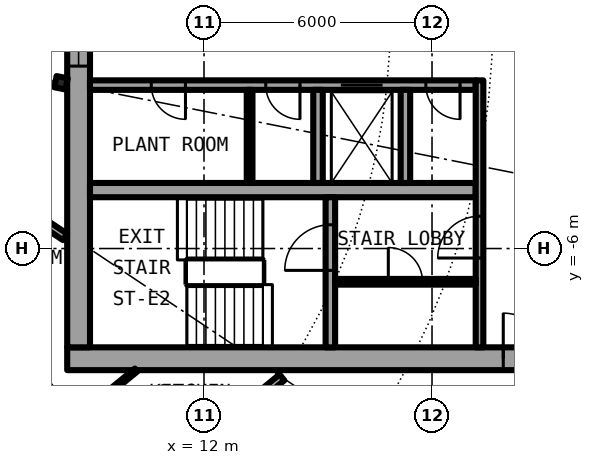
"""IFC4 building model, lengths in metres.
Left out: names, types, materials, properties, quantities, classifications, styles, units other than length and angle.
Written with IfcOpenShell. Run it as: python <this file> out.ifc"""

import sys

from ifc_helpers import new_model, si_unit, direction, frame, frame_2d, origin, origin_2d, place, context, subcontext, project, spatial, rectangle, i_section, extrude, element, fill, save


model = new_model("IFC4")
c1 = context("Model", 3, precision=1e-05, world=origin(), true_north=direction((0.0, 1.0)))
c2 = subcontext(c1, "Body", "Model", "MODEL_VIEW")
j1 = project(units=[si_unit("LENGTHUNIT", "METRE"), si_unit("PLANEANGLEUNIT", "RADIAN")], contexts=[c1])
p1 = place(None, origin())
s1 = spatial("IfcSite", under=j1, at=p1, CompositionType="ELEMENT")
p2 = place(p1, origin())
s2 = spatial("IfcBuilding", under=s1, at=p2, CompositionType="ELEMENT")
p3 = place(p2, frame((0.0, 0.0, 129.95)))
s3 = spatial("IfcBuildingStorey", under=s2, at=p3, CompositionType="ELEMENT", Elevation=129.95)
p4 = place(p3, frame((8.239, -1.639, 0.0), z_axis=(0.0, 0.0, 1.0), x_axis=(0.980785280403, -0.195090322016, 0.0)))
e1 = element("IfcColumn", 1, at=p4, inside=s3, PredefinedType="COLUMN", context=c2, shape_type="SweptSolid", body=[
    extrude(i_section(OverallWidth=0.3, OverallDepth=0.3, WebThickness=0.011, FlangeThickness=0.019, FilletRadius=0.027, at=origin_2d()), origin(), (0.0, 0.0, 1.0), 3.05),
])
p5 = place(p3, frame((8.4, -8.9, 0.0), z_axis=(0.0, 0.0, 1.0), x_axis=(1.0, 0.0, 0.0)))
e2 = element("IfcWall", 2, at=p5, inside=s3, PredefinedType="SHEAR", context=c2, shape_type="SweptSolid", body=[
    extrude(rectangle(XDim=13.8, YDim=0.6, at=frame_2d((6.9, 0.0))), origin(), (0.0, 0.0, 1.0), 3.05),
])
p6 = place(p5, frame((11.475, 0.0, 0.0)))
e3 = element("IfcOpeningElement", 3, at=p6, cuts=e2, PredefinedType="OPENING", context=c2, shape_type="SweptSolid", body=[
    extrude(rectangle(XDim=1.2, YDim=2.3, at=frame_2d((0.6, 1.15))), frame((0.0, 0.31, 0.0), z_axis=(0.0, -1.0, 0.0), x_axis=(1.0, 0.0, 0.0)), (0.0, 0.0, 1.0), 0.62),
])
p7 = place(p3, frame((8.7, -8.6, 0.0), z_axis=(0.0, 0.0, 1.0), x_axis=(0.0, 1.0, 0.0)))
e4 = element("IfcWall", 4, at=p7, inside=s3, PredefinedType="SHEAR", context=c2, shape_type="SweptSolid", body=[
    extrude(rectangle(XDim=17.2, YDim=0.6, at=frame_2d((8.6, 0.0))), origin(), (0.0, 0.0, 1.0), 3.05),
])
p8 = place(p7, frame((7.4, 0.0, 0.1)))
e5 = element("IfcOpeningElement", 5, at=p8, cuts=e4, PredefinedType="OPENING", context=c2, shape_type="SweptSolid", body=[
    extrude(rectangle(XDim=2.4, YDim=2.2, at=frame_2d((1.2, 1.1))), frame((0.0, 0.31, 0.0), z_axis=(0.0, -1.0, 0.0), x_axis=(1.0, 0.0, 0.0)), (0.0, 0.0, 1.0), 0.62),
])
p9 = place(p3, frame((19.15, -1.7, 0.0), z_axis=(0.0, 0.0, 1.0), x_axis=(-1.0, 0.0, 0.0)))
e6 = element("IfcWall", 6, at=p9, inside=s3, PredefinedType="SHEAR", context=c2, shape_type="SweptSolid", body=[
    extrude(rectangle(XDim=10.15, YDim=0.25, at=frame_2d((5.075, 0.0))), origin(), (0.0, 0.0, 1.0), 3.05),
])
p10 = place(p9, frame((2.45, 0.0, 0.0)))
e7 = element("IfcOpeningElement", 7, at=p10, cuts=e6, PredefinedType="OPENING", context=c2, shape_type="SweptSolid", body=[
    extrude(rectangle(XDim=1.1, YDim=2.3, at=frame_2d((0.55, 1.15))), frame((0.0, 0.135, 0.0), z_axis=(0.0, -1.0, 0.0), x_axis=(1.0, 0.0, 0.0)), (0.0, 0.0, 1.0), 0.27),
])
p11 = place(p9, frame((7.637, 0.0, 0.0)))
e8 = element("IfcOpeningElement", 8, at=p11, cuts=e6, PredefinedType="OPENING", context=c2, shape_type="SweptSolid", body=[
    extrude(rectangle(XDim=0.9, YDim=2.3, at=frame_2d((0.45, 1.15))), frame((0.0, 0.135, 0.0), z_axis=(0.0, -1.0, 0.0), x_axis=(1.0, 0.0, 0.0)), (0.0, 0.0, 1.0), 0.27),
])
p12 = place(p9, frame((4.625, 0.0, 0.0)))
e9 = element("IfcOpeningElement", 9, at=p12, cuts=e6, PredefinedType="OPENING", context=c2, shape_type="SweptSolid", body=[
    extrude(rectangle(XDim=0.9, YDim=2.3, at=frame_2d((0.45, 1.15))), frame((0.0, 0.135, 0.0), z_axis=(0.0, -1.0, 0.0), x_axis=(1.0, 0.0, 0.0)), (0.0, 0.0, 1.0), 0.27),
])
p13 = place(p9, frame((0.413, 0.0, 0.0)))
e10 = element("IfcOpeningElement", 10, at=p13, cuts=e6, PredefinedType="OPENING", context=c2, shape_type="SweptSolid", body=[
    extrude(rectangle(XDim=0.9, YDim=2.3, at=frame_2d((0.45, 1.15))), frame((0.0, 0.135, 0.0), z_axis=(0.0, -1.0, 0.0), x_axis=(1.0, 0.0, 0.0)), (0.0, 0.0, 1.0), 0.27),
])
p14 = place(p3, frame((9.0, -4.462, 0.0), z_axis=(0.0, 0.0, 1.0), x_axis=(1.0, 0.0, 0.0)))
e11 = element("IfcWall", 11, at=p14, inside=s3, PredefinedType="SHEAR", context=c2, shape_type="SweptSolid", body=[
    extrude(rectangle(XDim=10.15, YDim=0.375, at=frame_2d((5.075, 0.0))), origin(), (0.0, 0.0, 1.0), 3.05),
])
p15 = place(p3, frame((15.325, -8.6, 0.0), z_axis=(0.0, 0.0, 1.0), x_axis=(0.0, 1.0, 0.0)))
e12 = element("IfcWall", 12, at=p15, inside=s3, PredefinedType="SHEAR", context=c2, shape_type="SweptSolid", body=[
    extrude(rectangle(XDim=3.95, YDim=0.25, at=frame_2d((1.975, 0.0))), origin(), (0.0, 0.0, 1.0), 3.05),
])
p16 = place(p15, frame((2.025, 0.0, 0.0)))
e13 = element("IfcOpeningElement", 13, at=p16, cuts=e12, PredefinedType="OPENING", context=c2, shape_type="SweptSolid", body=[
    extrude(rectangle(XDim=1.2, YDim=2.3, at=frame_2d((0.6, 1.15))), frame((0.0, 0.135, 0.0), z_axis=(0.0, -1.0, 0.0), x_axis=(1.0, 0.0, 0.0)), (0.0, 0.0, 1.0), 0.27),
])
for number, where, z_axis, x_axis in (
    (14, (15.0, -1.825, 0.0), (0.0, 0.0, 1.0), (0.0, -1.0, 0.0)),
    (15, (17.3, -1.825, 0.0), (0.0, 0.0, 1.0), (0.0, -1.0, 0.0)),
):
    element("IfcWall", number, at=place(p3, frame(where, z_axis=z_axis, x_axis=x_axis)), inside=s3, PredefinedType="SOLIDWALL", context=c2, shape_type="SweptSolid", body=[
        extrude(rectangle(XDim=2.45, YDim=0.25, at=frame_2d((1.225, 0.0))), origin(), (0.0, 0.0, 1.0), 2.7),
    ])
p17 = place(p3, frame((19.25, -8.6, 0.0), z_axis=(0.0, 0.0, 1.0), x_axis=(0.0, 1.0, 0.0)))
e16 = element("IfcWall", 16, at=p17, inside=s3, PredefinedType="SOLIDWALL", context=c2, shape_type="SweptSolid", body=[
    extrude(rectangle(XDim=7.025, YDim=0.2, at=frame_2d((3.513, 0.0))), origin(), (0.0, 0.0, 1.0), 2.7),
])
p18 = place(p17, frame((2.35, 0.0, 0.0)))
e17 = element("IfcOpeningElement", 17, at=p18, cuts=e16, PredefinedType="OPENING", context=c2, shape_type="SweptSolid", body=[
    extrude(rectangle(XDim=1.1, YDim=2.3, at=frame_2d((0.55, 1.15))), frame((0.0, 0.11, 0.0), z_axis=(0.0, -1.0, 0.0), x_axis=(1.0, 0.0, 0.0)), (0.0, 0.0, 1.0), 0.22),
])
p19 = place(p3, frame((13.2, -1.825, 0.0), z_axis=(0.0, 0.0, 1.0), x_axis=(0.0, -1.0, 0.0)))
e18 = element("IfcWall", 18, at=p19, inside=s3, PredefinedType="PARTITIONING", context=c2, shape_type="SweptSolid", body=[
    extrude(rectangle(XDim=2.45, YDim=0.15, at=frame_2d((1.225, 0.0))), origin(), (0.0, 0.0, 1.0), 2.7),
])
p20 = place(p3, frame((15.45, -6.875, 0.0), z_axis=(0.0, 0.0, 1.0), x_axis=(1.0, 0.0, 0.0)))
e19 = element("IfcWall", 19, at=p20, inside=s3, PredefinedType="PARTITIONING", context=c2, shape_type="SweptSolid", body=[
    extrude(rectangle(XDim=3.7, YDim=0.15, at=frame_2d((1.85, 0.0))), origin(), (0.0, 0.0, 1.0), 2.7),
])
p21 = place(p20, frame((1.4, 0.0, 0.0)))
e20 = element("IfcOpeningElement", 20, at=p21, cuts=e19, PredefinedType="OPENING", context=c2, shape_type="SweptSolid", body=[
    extrude(rectangle(XDim=0.9, YDim=2.3, at=frame_2d((0.45, 1.15))), frame((0.0, 0.085, 0.0), z_axis=(0.0, -1.0, 0.0), x_axis=(1.0, 0.0, 0.0)), (0.0, 0.0, 1.0), 0.17),
])
p22 = place(p3, frame((6.467, -15.614, 0.0), z_axis=(0.0, 0.0, 1.0), x_axis=(0.773074935257, 0.634314704605, 0.0)))
e21 = element("IfcWall", 21, at=p22, inside=s3, PredefinedType="PARTITIONING", context=c2, shape_type="SweptSolid", body=[
    extrude(rectangle(XDim=9.809, YDim=0.2, at=frame_2d((4.904, 0.0))), origin(), (0.0, 0.0, 1.0), 2.7),
])
p23 = place(p22, frame((4.407, 0.0, 0.0)))
e22 = element("IfcOpeningElement", 22, at=p23, cuts=e21, PredefinedType="OPENING", context=c2, shape_type="SweptSolid", body=[
    extrude(rectangle(XDim=1.0, YDim=2.3, at=frame_2d((0.5, 1.15))), frame((0.0, 0.11, 0.0), z_axis=(0.0, -1.0, 0.0), x_axis=(1.0, 0.0, 0.0)), (0.0, 0.0, 1.0), 0.22),
])
p24 = place(p3, frame((8.625, -10.501, 0.0), z_axis=(0.0, 0.0, 1.0), x_axis=(0.772817828959, 0.634627925042, 0.0)))
e23 = element("IfcWall", 23, at=p24, inside=s3, PredefinedType="PARTITIONING", context=c2, shape_type="SweptSolid", body=[
    extrude(rectangle(XDim=2.055, YDim=0.1, at=frame_2d((1.027, 0.0))), origin(), (0.0, 0.0, 1.0), 2.7),
])
p25 = place(p3, frame((6.513, -4.472, 0.0), z_axis=(0.0, 0.0, 1.0), x_axis=(0.831333375071, -0.555774072347, 0.0)))
e24 = element("IfcWall", 24, at=p25, inside=s3, PredefinedType="PARTITIONING", context=c2, shape_type="SweptSolid", body=[
    extrude(rectangle(XDim=2.203, YDim=0.2, at=frame_2d((1.101, 0.0))), origin(), (0.0, 0.0, 1.0), 2.7),
])
p26 = place(p3, frame((4.898, -5.968, 0.0), z_axis=(0.0, 0.0, 1.0), x_axis=(0.634358693064, -0.773038840249, 0.0)))
e25 = element("IfcWall", 25, at=p26, inside=s3, PredefinedType="PARTITIONING", context=c2, shape_type="SweptSolid", body=[
    extrude(rectangle(XDim=5.868, YDim=0.1, at=frame_2d((2.934, 0.0))), origin(), (0.0, 0.0, 1.0), 2.7),
])
p27 = place(p26, frame((2.484, 0.0, 0.0)))
e26 = element("IfcOpeningElement", 26, at=p27, cuts=e25, PredefinedType="OPENING", context=c2, shape_type="SweptSolid", body=[
    extrude(rectangle(XDim=0.9, YDim=2.3, at=frame_2d((0.45, 1.15))), frame((0.0, 0.06, 0.0), z_axis=(0.0, -1.0, 0.0), x_axis=(1.0, 0.0, 0.0)), (0.0, 0.0, 1.0), 0.12),
])
p28 = place(p3, frame((9.683, -9.632, 0.0), z_axis=(0.0, 0.0, 1.0), x_axis=(0.708796844581, -0.705412668665, 0.0)))
e27 = element("IfcWall", 27, at=p28, inside=s3, PredefinedType="PARTITIONING", context=c2, shape_type="SweptSolid", body=[
    extrude(rectangle(XDim=2.597, YDim=0.1, at=frame_2d((1.299, 0.0))), origin(), (0.0, 0.0, 1.0), 2.7),
])
p29 = place(p28, frame((0.849, 0.0, 0.0)))
e28 = element("IfcOpeningElement", 28, at=p29, cuts=e27, PredefinedType="OPENING", context=c2, shape_type="SweptSolid", body=[
    extrude(rectangle(XDim=0.9, YDim=2.3, at=frame_2d((0.45, 1.15))), frame((0.0, 0.06, 0.0), z_axis=(0.0, -1.0, 0.0), x_axis=(1.0, 0.0, 0.0)), (0.0, 0.0, 1.0), 0.12),
])
p30 = place(p10, origin())
e29 = element("IfcDoor", 29, at=p30, inside=s3, OperationType="DOUBLE_DOOR_SLIDING", PredefinedType="DOOR", context=c2, shape_type="SweptSolid", body=[
    extrude(rectangle(XDim=1.1, YDim=2.3, at=frame_2d((0.55, 1.15))), frame((0.0, 0.025, 0.0), z_axis=(0.0, -1.0, 0.0), x_axis=(1.0, 0.0, 0.0)), (0.0, 0.0, 1.0), 0.05),
])
fill(e7, e29)
p31 = place(p11, origin())
e30 = element("IfcDoor", 30, at=p31, inside=s3, OperationType="SINGLE_SWING_LEFT", PredefinedType="DOOR", context=c2, shape_type="SweptSolid", body=[
    extrude(rectangle(XDim=0.9, YDim=2.3, at=frame_2d((0.45, 1.15))), frame((0.0, 0.025, 0.0), z_axis=(0.0, -1.0, 0.0), x_axis=(1.0, 0.0, 0.0)), (0.0, 0.0, 1.0), 0.05),
])
fill(e8, e30)
p32 = place(p12, origin())
e31 = element("IfcDoor", 31, at=p32, inside=s3, OperationType="SINGLE_SWING_LEFT", PredefinedType="DOOR", context=c2, shape_type="SweptSolid", body=[
    extrude(rectangle(XDim=0.9, YDim=2.3, at=frame_2d((0.45, 1.15))), frame((0.0, 0.025, 0.0), z_axis=(0.0, -1.0, 0.0), x_axis=(1.0, 0.0, 0.0)), (0.0, 0.0, 1.0), 0.05),
])
fill(e9, e31)
p33 = place(p13, origin())
e32 = element("IfcDoor", 32, at=p33, inside=s3, OperationType="SINGLE_SWING_RIGHT", PredefinedType="DOOR", context=c2, shape_type="SweptSolid", body=[
    extrude(rectangle(XDim=0.9, YDim=2.3, at=frame_2d((0.45, 1.15))), frame((0.0, 0.025, 0.0), z_axis=(0.0, -1.0, 0.0), x_axis=(1.0, 0.0, 0.0)), (0.0, 0.0, 1.0), 0.05),
])
fill(e10, e32)
p34 = place(p21, origin())
e33 = element("IfcDoor", 33, at=p34, inside=s3, OperationType="SINGLE_SWING_LEFT", PredefinedType="DOOR", context=c2, shape_type="SweptSolid", body=[
    extrude(rectangle(XDim=0.9, YDim=2.3, at=frame_2d((0.45, 1.15))), frame((0.0, 0.025, 0.0), z_axis=(0.0, -1.0, 0.0), x_axis=(1.0, 0.0, 0.0)), (0.0, 0.0, 1.0), 0.05),
])
fill(e20, e33)
p35 = place(p16, origin())
e34 = element("IfcDoor", 34, at=p35, inside=s3, OperationType="SINGLE_SWING_LEFT", PredefinedType="DOOR", context=c2, shape_type="SweptSolid", body=[
    extrude(rectangle(XDim=1.2, YDim=2.3, at=frame_2d((0.6, 1.15))), frame((0.0, 0.025, 0.0), z_axis=(0.0, -1.0, 0.0), x_axis=(1.0, 0.0, 0.0)), (0.0, 0.0, 1.0), 0.05),
])
fill(e13, e34)
p36 = place(p18, origin())
e35 = element("IfcDoor", 35, at=p36, inside=s3, OperationType="SINGLE_SWING_RIGHT", PredefinedType="DOOR", context=c2, shape_type="SweptSolid", body=[
    extrude(rectangle(XDim=1.1, YDim=2.3, at=frame_2d((0.55, 1.15))), frame((0.0, 0.025, 0.0), z_axis=(0.0, -1.0, 0.0), x_axis=(1.0, 0.0, 0.0)), (0.0, 0.0, 1.0), 0.05),
])
fill(e17, e35)
p37 = place(p6, origin())
e36 = element("IfcDoor", 36, at=p37, inside=s3, OperationType="SINGLE_SWING_LEFT", PredefinedType="DOOR", context=c2, shape_type="SweptSolid", body=[
    extrude(rectangle(XDim=1.2, YDim=2.3, at=frame_2d((0.6, 1.15))), frame((0.0, 0.025, 0.0), z_axis=(0.0, -1.0, 0.0), x_axis=(1.0, 0.0, 0.0)), (0.0, 0.0, 1.0), 0.05),
])
fill(e3, e36)
p38 = place(p8, origin())
e37 = element("IfcWindow", 37, at=p38, inside=s3, PartitioningType="SINGLE_PANEL", PredefinedType="WINDOW", context=c2, shape_type="SweptSolid", body=[
    extrude(rectangle(XDim=2.4, YDim=2.2, at=frame_2d((1.2, 1.1))), frame((0.0, 0.03, 0.0), z_axis=(0.0, -1.0, 0.0), x_axis=(1.0, 0.0, 0.0)), (0.0, 0.0, 1.0), 0.06),
])
fill(e5, e37)
save(model, sys.argv[1])
